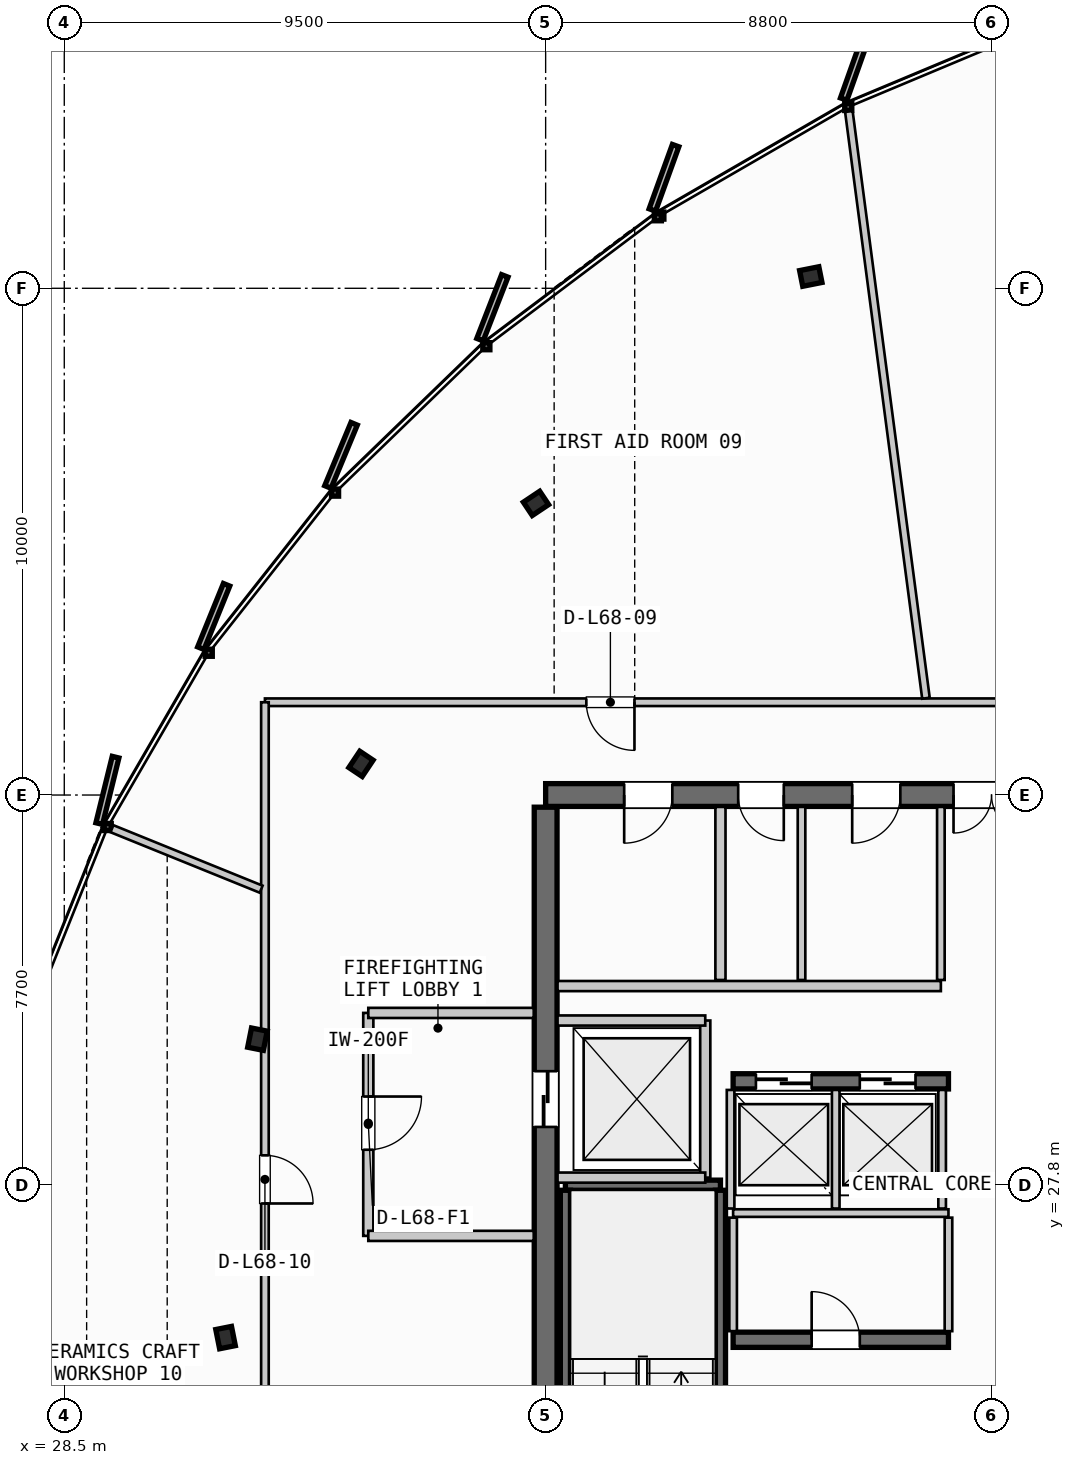
"""IFC4 building model, lengths in metres.
Left out: names, types, materials, properties, quantities, classifications, styles, units other than length and angle.
Written with IfcOpenShell. Run it as: python <this file> out.ifc"""

import sys

from ifc_helpers import new_model, si_unit, direction, frame, frame_2d, origin, origin_2d, place, context, subcontext, project, spatial, rectangle, i_section, extrude, source, transform, mapped, element, fill, save


model = new_model("IFC4")
c1 = context("Model", 3, precision=1e-05, world=origin(), true_north=direction((0.0, 1.0)))
c2 = subcontext(c1, "Body", "Model", "MODEL_VIEW")
j1 = project(units=[si_unit("LENGTHUNIT", "METRE"), si_unit("PLANEANGLEUNIT", "RADIAN")], contexts=[c1])
p1 = place(None, origin())
s1 = spatial("IfcSite", under=j1, at=p1, CompositionType="ELEMENT")
p2 = place(p1, origin())
s2 = spatial("IfcBuilding", under=s1, at=p2, CompositionType="ELEMENT")
p3 = place(p2, frame((0.0, 0.0, 259.45)))
s3 = spatial("IfcBuildingStorey", under=s2, at=p3, CompositionType="ELEMENT", Elevation=259.45)
p4 = place(p3, frame((55.6, 35.5, 0.0), z_axis=(0.0, 0.0, 1.0), x_axis=(-1.0, 0.0, 0.0)))
e1 = element("IfcWall", 1, at=p4, inside=s3, PredefinedType="SHEAR", context=c2, shape_type="SweptSolid", body=[
    extrude(rectangle(XDim=17.6, YDim=0.45, at=frame_2d((8.8, 0.0))), origin(), (0.0, 0.0, 1.0), 3.21),
])
p5 = place(p4, frame((8.05, 0.0, 0.0)))
e2 = element("IfcOpeningElement", 2, at=p5, cuts=e1, PredefinedType="OPENING", context=c2, shape_type="SweptSolid", body=[
    extrude(rectangle(XDim=1.5, YDim=2.2, at=frame_2d((0.75, 1.1))), frame((0.0, 0.235, 0.0), z_axis=(0.0, -1.0, 0.0), x_axis=(1.0, 0.0, 0.0)), (0.0, 0.0, 1.0), 0.47),
])
p6 = place(p4, frame((15.1, 0.0, 0.0)))
e3 = element("IfcOpeningElement", 3, at=p6, cuts=e1, PredefinedType="OPENING", context=c2, shape_type="SweptSolid", body=[
    extrude(rectangle(XDim=0.95, YDim=2.15, at=frame_2d((0.475, 1.075))), frame((0.0, 0.235, 0.0), z_axis=(0.0, -1.0, 0.0), x_axis=(1.0, 0.0, 0.0)), (0.0, 0.0, 1.0), 0.47),
])
p7 = place(p4, frame((12.9, 0.0, 0.0)))
e4 = element("IfcOpeningElement", 4, at=p7, cuts=e1, PredefinedType="OPENING", context=c2, shape_type="SweptSolid", body=[
    extrude(rectangle(XDim=0.9, YDim=2.15, at=frame_2d((0.45, 1.075))), frame((0.0, 0.235, 0.0), z_axis=(0.0, -1.0, 0.0), x_axis=(1.0, 0.0, 0.0)), (0.0, 0.0, 1.0), 0.47),
])
p8 = place(p4, frame((10.6, 0.0, 0.0)))
e5 = element("IfcOpeningElement", 5, at=p8, cuts=e1, PredefinedType="OPENING", context=c2, shape_type="SweptSolid", body=[
    extrude(rectangle(XDim=0.95, YDim=2.15, at=frame_2d((0.475, 1.075))), frame((0.0, 0.235, 0.0), z_axis=(0.0, -1.0, 0.0), x_axis=(1.0, 0.0, 0.0)), (0.0, 0.0, 1.0), 0.47),
])
p9 = place(p3, frame((38.0, 35.26, 0.0), z_axis=(0.0, 0.0, 1.0), x_axis=(0.0, -1.0, 0.0)))
e6 = element("IfcWall", 6, at=p9, inside=s3, PredefinedType="SHEAR", context=c2, shape_type="SweptSolid", body=[
    extrude(rectangle(XDim=14.92, YDim=0.45, at=frame_2d((7.46, 0.0))), origin(), (0.0, 0.0, 1.0), 3.21),
])
p10 = place(p9, frame((5.21, 0.0, 0.0)))
e7 = element("IfcOpeningElement", 7, at=p10, cuts=e6, PredefinedType="OPENING", context=c2, shape_type="SweptSolid", body=[
    extrude(rectangle(XDim=1.1, YDim=2.2, at=frame_2d((0.55, 1.1))), frame((0.0, 0.235, 0.0), z_axis=(0.0, -1.0, 0.0), x_axis=(1.0, 0.0, 0.0)), (0.0, 0.0, 1.0), 0.47),
])
p11 = place(p3, frame((41.7, 24.75, 0.0), z_axis=(0.0, 0.0, 1.0), x_axis=(1.0, 0.0, 0.0)))
e8 = element("IfcWall", 8, at=p11, inside=s3, PredefinedType="SHEAR", context=c2, shape_type="SweptSolid", body=[
    extrude(rectangle(XDim=4.25, YDim=0.3, at=frame_2d((2.125, 0.0))), origin(), (0.0, 0.0, 1.0), 3.21),
])
p12 = place(p11, frame((1.55, 0.0, 0.0)))
e9 = element("IfcOpeningElement", 9, at=p12, cuts=e8, PredefinedType="OPENING", context=c2, shape_type="SweptSolid", body=[
    extrude(rectangle(XDim=0.95, YDim=2.15, at=frame_2d((0.475, 1.075))), frame((0.0, 0.16, 0.0), z_axis=(0.0, -1.0, 0.0), x_axis=(1.0, 0.0, 0.0)), (0.0, 0.0, 1.0), 0.32),
])
p13 = place(p3, frame((41.7, 29.85, 0.0), z_axis=(0.0, 0.0, 1.0), x_axis=(1.0, 0.0, 0.0)))
e10 = element("IfcWall", 10, at=p13, inside=s3, PredefinedType="SHEAR", context=c2, shape_type="SweptSolid", body=[
    extrude(rectangle(XDim=4.25, YDim=0.3, at=frame_2d((2.125, 0.0))), origin(), (0.0, 0.0, 1.0), 3.21),
])
p14 = place(p13, frame((0.45, 0.0, 0.0)))
e11 = element("IfcOpeningElement", 11, at=p14, cuts=e10, PredefinedType="OPENING", context=c2, shape_type="SweptSolid", body=[
    extrude(rectangle(XDim=1.1, YDim=2.2, at=frame_2d((0.55, 1.1))), frame((0.0, 0.16, 0.0), z_axis=(0.0, -1.0, 0.0), x_axis=(1.0, 0.0, 0.0)), (0.0, 0.0, 1.0), 0.32),
])
p15 = place(p13, frame((2.5, 0.0, 0.0)))
e12 = element("IfcOpeningElement", 12, at=p15, cuts=e10, PredefinedType="OPENING", context=c2, shape_type="SweptSolid", body=[
    extrude(rectangle(XDim=1.1, YDim=2.2, at=frame_2d((0.55, 1.1))), frame((0.0, 0.16, 0.0), z_axis=(0.0, -1.0, 0.0), x_axis=(1.0, 0.0, 0.0)), (0.0, 0.0, 1.0), 0.32),
])
m1 = source(origin(), c2, "Body", "SweptSolid", [
    extrude(i_section(OverallWidth=0.387, OverallDepth=0.316, WebThickness=0.019, FlangeThickness=0.028, FilletRadius=0.015, at=origin_2d()), origin(), (0.0, 0.0, 1.0), 3.21),
])
for number, where, z_axis, x_axis in (
    (13, (43.233, 45.732, 0.0), (0.0, 0.0, 1.0), (-0.195, 0.981, 0.0)),
    (14, (37.81, 41.255, 0.0), (0.0, 0.0, 1.0), (-0.556, 0.831, 0.0)),
    (15, (34.356, 36.115, 0.0), (0.0, 0.0, 1.0), (-0.831, 0.556, 0.0)),
    (16, (32.312, 30.682, 0.0), (0.0, 0.0, 1.0), (-0.981, 0.195, 0.0)),
    (17, (31.683, 24.793, 0.0), (0.0, 0.0, 1.0), (-0.981, -0.195, 0.0)),
):
    element("IfcColumn", number, at=place(p3, frame(where, z_axis=z_axis, x_axis=x_axis)), inside=s3, PredefinedType="COLUMN", context=c2, shape_type="MappedRepresentation", body=[
        mapped(m1, transform((0.0, 0.0, 0.0), scale=1.0)),
    ])
p16 = place(p3, frame((38.39, 27.8, 0.0), z_axis=(0.0, 0.0, 1.0), x_axis=(1.0, 0.0, 0.0)))
e18 = element("IfcWall", 18, at=p16, inside=s3, PredefinedType="SHEAR", context=c2, shape_type="SweptSolid", body=[
    extrude(rectangle(XDim=3.06, YDim=0.2, at=frame_2d((1.53, 0.0))), origin(), (0.0, 0.0, 1.0), 3.21),
])
for number, where, z_axis, x_axis in (
    (19, (41.45, 27.7, 0.0), (0.0, 0.0, 1.0), (0.0, -1.0, 0.0)),
    (20, (38.39, 20.35, 0.0), (0.0, 0.0, 1.0), (0.0, 1.0, 0.0)),
):
    element("IfcWall", number, at=place(p3, frame(where, z_axis=z_axis, x_axis=x_axis)), inside=s3, PredefinedType="SHEAR", context=c2, shape_type="SweptSolid", body=[
        extrude(rectangle(XDim=7.35, YDim=0.2, at=frame_2d((3.675, 0.0))), origin(), (0.0, 0.0, 1.0), 3.21),
    ])
p17 = place(p3, frame((41.15, 27.95, 0.0), z_axis=(0.0, 0.0, 1.0), x_axis=(0.0, 1.0, 0.0)))
e21 = element("IfcWall", 21, at=p17, inside=s3, PredefinedType="PARTITIONING", context=c2, shape_type="SweptSolid", body=[
    extrude(rectangle(XDim=3.1, YDim=0.2, at=frame_2d((1.55, 0.0))), origin(), (0.0, 0.0, 1.0), 2.735),
])
for number, where, z_axis, x_axis in (
    (22, (38.235, 27.95, 0.0), (0.0, 0.0, 1.0), (1.0, 0.0, 0.0)),
    (23, (38.235, 31.05, 0.0), (0.0, 0.0, 1.0), (1.0, 0.0, 0.0)),
):
    element("IfcWall", number, at=place(p3, frame(where, z_axis=z_axis, x_axis=x_axis)), inside=s3, PredefinedType="PARTITIONING", context=c2, shape_type="SweptSolid", body=[
        extrude(rectangle(XDim=2.915, YDim=0.2, at=frame_2d((1.458, 0.0))), origin(), (0.0, 0.0, 1.0), 2.735),
    ])
p18 = place(p3, frame((34.5, 31.2, 0.0), z_axis=(0.0, 0.0, 1.0), x_axis=(0.0, -1.0, 0.0)))
e24 = element("IfcWall", 24, at=p18, inside=s3, PredefinedType="PARTITIONING", context=c2, shape_type="SweptSolid", body=[
    extrude(rectangle(XDim=4.4, YDim=0.2, at=frame_2d((2.2, 0.0))), origin(), (0.0, 0.0, 1.0), 2.735),
])
p19 = place(p18, frame((1.65, 0.0, 0.0)))
e25 = element("IfcOpeningElement", 25, at=p19, cuts=e24, PredefinedType="OPENING", context=c2, shape_type="SweptSolid", body=[
    extrude(rectangle(XDim=1.05, YDim=2.15, at=frame_2d((0.525, 1.075))), frame((0.0, 0.11, 0.0), z_axis=(0.0, -1.0, 0.0), x_axis=(1.0, 0.0, 0.0)), (0.0, 0.0, 1.0), 0.22),
])
for number, where, z_axis, x_axis in (
    (26, (34.5, 26.8, 0.0), (0.0, 0.0, 1.0), (1.0, 0.0, 0.0)),
    (27, (34.5, 31.2, 0.0), (0.0, 0.0, 1.0), (1.0, 0.0, 0.0)),
):
    element("IfcWall", number, at=place(p3, frame(where, z_axis=z_axis, x_axis=x_axis)), inside=s3, PredefinedType="PARTITIONING", context=c2, shape_type="SweptSolid", body=[
        extrude(rectangle(XDim=3.265, YDim=0.2, at=frame_2d((1.632, 0.0))), origin(), (0.0, 0.0, 1.0), 2.735),
    ])
p20 = place(p3, frame((41.7, 27.25, 0.0), z_axis=(0.0, 0.0, 1.0), x_axis=(1.0, 0.0, 0.0)))
e28 = element("IfcWall", 28, at=p20, inside=s3, PredefinedType="PARTITIONING", context=c2, shape_type="SweptSolid", body=[
    extrude(rectangle(XDim=4.25, YDim=0.15, at=frame_2d((2.125, 0.0))), origin(), (0.0, 0.0, 1.0), 2.735),
])
for number, where, z_axis, x_axis in (
    (29, (41.7, 24.92, 0.0), (0.0, 0.0, 1.0), (0.0, 1.0, 0.0)),
    (30, (45.95, 24.92, 0.0), (0.0, 0.0, 1.0), (0.0, 1.0, 0.0)),
):
    element("IfcWall", number, at=place(p3, frame(where, z_axis=z_axis, x_axis=x_axis)), inside=s3, PredefinedType="PARTITIONING", context=c2, shape_type="SweptSolid", body=[
        extrude(rectangle(XDim=2.24, YDim=0.15, at=frame_2d((1.12, 0.0))), origin(), (0.0, 0.0, 1.0), 2.735),
    ])
for number, where, z_axis, x_axis in (
    (31, (41.65, 27.34, 0.0), (0.0, 0.0, 1.0), (0.0, 1.0, 0.0)),
    (32, (43.725, 27.34, 0.0), (0.0, 0.0, 1.0), (0.0, 1.0, 0.0)),
    (33, (45.825, 27.34, 0.0), (0.0, 0.0, 1.0), (0.0, 1.0, 0.0)),
):
    element("IfcWall", number, at=place(p3, frame(where, z_axis=z_axis, x_axis=x_axis)), inside=s3, PredefinedType="PARTITIONING", context=c2, shape_type="SweptSolid", body=[
        extrude(rectangle(XDim=2.34, YDim=0.15, at=frame_2d((1.17, 0.0))), origin(), (0.0, 0.0, 1.0), 2.735),
    ])
p21 = place(p3, frame((41.45, 31.85, 0.0), z_axis=(0.0, 0.0, 1.0), x_axis=(0.0, 1.0, 0.0)))
e34 = element("IfcWall", 34, at=p21, inside=s3, PredefinedType="PARTITIONING", context=c2, shape_type="SweptSolid", body=[
    extrude(rectangle(XDim=3.415, YDim=0.2, at=frame_2d((1.708, 0.0))), origin(), (0.0, 0.0, 1.0), 2.735),
])
p22 = place(p3, frame((38.235, 31.73, 0.0), z_axis=(0.0, 0.0, 1.0), x_axis=(1.0, 0.0, 0.0)))
e35 = element("IfcWall", 35, at=p22, inside=s3, PredefinedType="PARTITIONING", context=c2, shape_type="SweptSolid", body=[
    extrude(rectangle(XDim=7.565, YDim=0.2, at=frame_2d((3.782, 0.0))), origin(), (0.0, 0.0, 1.0), 2.735),
])
p23 = place(p3, frame((45.8, 31.85, 0.0), z_axis=(0.0, 0.0, 1.0), x_axis=(0.0, 1.0, 0.0)))
e36 = element("IfcWall", 36, at=p23, inside=s3, PredefinedType="PARTITIONING", context=c2, shape_type="SweptSolid", body=[
    extrude(rectangle(XDim=3.415, YDim=0.15, at=frame_2d((1.708, 0.0))), origin(), (0.0, 0.0, 1.0), 2.735),
])
p24 = place(p3, frame((43.05, 31.85, 0.0), z_axis=(0.0, 0.0, 1.0), x_axis=(0.0, 1.0, 0.0)))
e37 = element("IfcWall", 37, at=p24, inside=s3, PredefinedType="PLUMBINGWALL", context=c2, shape_type="SweptSolid", body=[
    extrude(rectangle(XDim=3.415, YDim=0.15, at=frame_2d((1.708, 0.0))), origin(), (0.0, 0.0, 1.0), 2.735),
])
p25 = place(p3, frame((61.902, 37.331, 0.0), z_axis=(0.0, 0.0, 1.0), x_axis=(-1.0, 0.0, 0.0)))
e38 = element("IfcWall", 38, at=p25, inside=s3, PredefinedType="PARTITIONING", context=c2, shape_type="SweptSolid", body=[
    extrude(rectangle(XDim=29.442, YDim=0.15, at=frame_2d((14.721, 0.0))), origin(), (0.0, 0.0, 1.0), 2.735),
])
p26 = place(p25, frame((1.954, 0.0, 0.0)))
e39 = element("IfcOpeningElement", 39, at=p26, cuts=e38, PredefinedType="OPENING", context=c2, shape_type="SweptSolid", body=[
    extrude(rectangle(XDim=0.95, YDim=2.15, at=frame_2d((0.475, 1.075))), frame((0.0, 0.085, 0.0), z_axis=(0.0, -1.0, 0.0), x_axis=(1.0, 0.0, 0.0)), (0.0, 0.0, 1.0), 0.17),
])
p27 = place(p25, frame((6.698, 0.0, 0.0)))
e40 = element("IfcOpeningElement", 40, at=p27, cuts=e38, PredefinedType="OPENING", context=c2, shape_type="SweptSolid", body=[
    extrude(rectangle(XDim=0.95, YDim=2.15, at=frame_2d((0.475, 1.075))), frame((0.0, 0.085, 0.0), z_axis=(0.0, -1.0, 0.0), x_axis=(1.0, 0.0, 0.0)), (0.0, 0.0, 1.0), 0.17),
])
p28 = place(p25, frame((12.808, 0.0, 0.0)))
e41 = element("IfcOpeningElement", 41, at=p28, cuts=e38, PredefinedType="OPENING", context=c2, shape_type="SweptSolid", body=[
    extrude(rectangle(XDim=0.95, YDim=2.15, at=frame_2d((0.475, 1.075))), frame((0.0, 0.085, 0.0), z_axis=(0.0, -1.0, 0.0), x_axis=(1.0, 0.0, 0.0)), (0.0, 0.0, 1.0), 0.17),
])
p29 = place(p25, frame((22.149, 0.0, 0.0)))
e42 = element("IfcOpeningElement", 42, at=p29, cuts=e38, PredefinedType="OPENING", context=c2, shape_type="SweptSolid", body=[
    extrude(rectangle(XDim=0.95, YDim=2.15, at=frame_2d((0.475, 1.075))), frame((0.0, 0.085, 0.0), z_axis=(0.0, -1.0, 0.0), x_axis=(1.0, 0.0, 0.0)), (0.0, 0.0, 1.0), 0.17),
])
p30 = place(p3, frame((32.46, 37.331, 0.0), z_axis=(0.0, 0.0, 1.0), x_axis=(0.0, -1.0, 0.0)))
e43 = element("IfcWall", 43, at=p30, inside=s3, PredefinedType="PARTITIONING", context=c2, shape_type="SweptSolid", body=[
    extrude(rectangle(XDim=19.524, YDim=0.15, at=frame_2d((9.762, 0.0))), origin(), (0.0, 0.0, 1.0), 2.735),
])
p31 = place(p30, frame((16.555, 0.0, 0.0)))
e44 = element("IfcOpeningElement", 44, at=p31, cuts=e43, PredefinedType="OPENING", context=c2, shape_type="SweptSolid", body=[
    extrude(rectangle(XDim=0.95, YDim=2.15, at=frame_2d((0.475, 1.075))), frame((0.0, 0.085, 0.0), z_axis=(0.0, -1.0, 0.0), x_axis=(1.0, 0.0, 0.0)), (0.0, 0.0, 1.0), 0.17),
])
p32 = place(p30, frame((8.942, 0.0, 0.0)))
e45 = element("IfcOpeningElement", 45, at=p32, cuts=e43, PredefinedType="OPENING", context=c2, shape_type="SweptSolid", body=[
    extrude(rectangle(XDim=0.95, YDim=2.15, at=frame_2d((0.475, 1.075))), frame((0.0, 0.085, 0.0), z_axis=(0.0, -1.0, 0.0), x_axis=(1.0, 0.0, 0.0)), (0.0, 0.0, 1.0), 0.17),
])
p33 = place(p3, frame((45.506, 37.41, 0.0), z_axis=(0.0, 0.0, 1.0), x_axis=(-0.130305253758, 0.991473923431, 0.0)))
e46 = element("IfcWall", 46, at=p33, inside=s3, PredefinedType="PARTITIONING", context=c2, shape_type="SweptSolid", body=[
    extrude(rectangle(XDim=11.678, YDim=0.15, at=frame_2d((5.839, 0.0))), origin(), (0.0, 0.0, 1.0), 2.735),
])
p34 = place(p3, frame((32.386, 33.642, 0.0), z_axis=(0.0, 0.0, 1.0), x_axis=(-0.92674505075, 0.375690844859, 0.0)))
e47 = element("IfcWall", 47, at=p34, inside=s3, PredefinedType="PARTITIONING", context=c2, shape_type="SweptSolid", body=[
    extrude(rectangle(XDim=3.178, YDim=0.15, at=frame_2d((1.589, 0.0))), origin(), (0.0, 0.0, 1.0), 2.735),
])
m2 = source(origin(), c2, "Body", "SweptSolid", [
    extrude(rectangle(XDim=1.5, YDim=2.2, at=frame_2d((0.75, 1.1))), frame((0.0, 0.025, 0.0), z_axis=(0.0, -1.0, 0.0), x_axis=(1.0, 0.0, 0.0)), (0.0, 0.0, 1.0), 0.05),
])
p35 = place(p5, origin())
e48 = element("IfcDoor", 48, at=p35, inside=s3, OperationType="DOUBLE_DOOR_SINGLE_SWING", PredefinedType="DOOR", context=c2, shape_type="MappedRepresentation", body=[
    mapped(m2, transform((0.0, 0.0, 0.0), scale=1.0)),
])
fill(e2, e48)
m3 = source(origin(), c2, "Body", "SweptSolid", [
    extrude(rectangle(XDim=1.1, YDim=2.2, at=frame_2d((0.55, 1.1))), frame((0.0, 0.025, 0.0), z_axis=(0.0, -1.0, 0.0), x_axis=(1.0, 0.0, 0.0)), (0.0, 0.0, 1.0), 0.05),
])
p36 = place(p10, origin())
e49 = element("IfcDoor", 49, at=p36, inside=s3, OperationType="SLIDING_TO_LEFT", PredefinedType="DOOR", context=c2, shape_type="MappedRepresentation", body=[
    mapped(m3, transform((0.0, 0.0, 0.0), scale=1.0)),
])
fill(e7, e49)
m4 = source(origin(), c2, "Body", "SweptSolid", [
    extrude(rectangle(XDim=0.95, YDim=2.15, at=frame_2d((0.475, 1.075))), frame((0.0, 0.025, 0.0), z_axis=(0.0, -1.0, 0.0), x_axis=(1.0, 0.0, 0.0)), (0.0, 0.0, 1.0), 0.05),
])
p37 = place(p12, origin())
e50 = element("IfcDoor", 50, at=p37, inside=s3, OperationType="SINGLE_SWING_LEFT", PredefinedType="DOOR", context=c2, shape_type="MappedRepresentation", body=[
    mapped(m4, transform((0.0, 0.0, 0.0), scale=1.0)),
])
fill(e9, e50)
p38 = place(p14, origin())
e51 = element("IfcDoor", 51, at=p38, inside=s3, OperationType="SLIDING_TO_LEFT", PredefinedType="DOOR", context=c2, shape_type="MappedRepresentation", body=[
    mapped(m3, transform((0.0, 0.0, 0.0), scale=1.0)),
])
fill(e11, e51)
p39 = place(p15, origin())
e52 = element("IfcDoor", 52, at=p39, inside=s3, OperationType="SLIDING_TO_LEFT", PredefinedType="DOOR", context=c2, shape_type="MappedRepresentation", body=[
    mapped(m3, transform((0.0, 0.0, 0.0), scale=1.0)),
])
fill(e12, e52)
p40 = place(p6, origin())
e53 = element("IfcDoor", 53, at=p40, inside=s3, OperationType="SINGLE_SWING_RIGHT", PredefinedType="DOOR", context=c2, shape_type="MappedRepresentation", body=[
    mapped(m4, transform((0.0, 0.0, 0.0), scale=1.0)),
])
fill(e3, e53)
m5 = source(origin(), c2, "Body", "SweptSolid", [
    extrude(rectangle(XDim=0.9, YDim=2.15, at=frame_2d((0.45, 1.075))), frame((0.0, 0.025, 0.0), z_axis=(0.0, -1.0, 0.0), x_axis=(1.0, 0.0, 0.0)), (0.0, 0.0, 1.0), 0.05),
])
p41 = place(p7, origin())
e54 = element("IfcDoor", 54, at=p41, inside=s3, OperationType="SINGLE_SWING_LEFT", PredefinedType="DOOR", context=c2, shape_type="MappedRepresentation", body=[
    mapped(m5, transform((0.0, 0.0, 0.0), scale=1.0)),
])
fill(e4, e54)
p42 = place(p8, origin())
e55 = element("IfcDoor", 55, at=p42, inside=s3, OperationType="SINGLE_SWING_RIGHT", PredefinedType="DOOR", context=c2, shape_type="MappedRepresentation", body=[
    mapped(m4, transform((0.0, 0.0, 0.0), scale=1.0)),
])
fill(e5, e55)
m6 = source(origin(), c2, "Body", "SweptSolid", [
    extrude(rectangle(XDim=1.05, YDim=2.15, at=frame_2d((0.525, 1.075))), frame((0.0, 0.025, 0.0), z_axis=(0.0, -1.0, 0.0), x_axis=(1.0, 0.0, 0.0)), (0.0, 0.0, 1.0), 0.05),
])
p43 = place(p19, origin())
e56 = element("IfcDoor", 56, at=p43, inside=s3, OperationType="SINGLE_SWING_LEFT", PredefinedType="DOOR", context=c2, shape_type="MappedRepresentation", body=[
    mapped(m6, transform((0.0, 0.0, 0.0), scale=1.0)),
])
fill(e25, e56)
p44 = place(p29, origin())
e57 = element("IfcDoor", 57, at=p44, inside=s3, OperationType="SINGLE_SWING_LEFT", PredefinedType="DOOR", context=c2, shape_type="MappedRepresentation", body=[
    mapped(m4, transform((0.0, 0.0, 0.0), scale=1.0)),
])
fill(e42, e57)
p45 = place(p32, origin())
e58 = element("IfcDoor", 58, at=p45, inside=s3, OperationType="SINGLE_SWING_RIGHT", PredefinedType="DOOR", context=c2, shape_type="MappedRepresentation", body=[
    mapped(m4, transform((0.0, 0.0, 0.0), scale=1.0)),
])
fill(e45, e58)
save(model, sys.argv[1])
